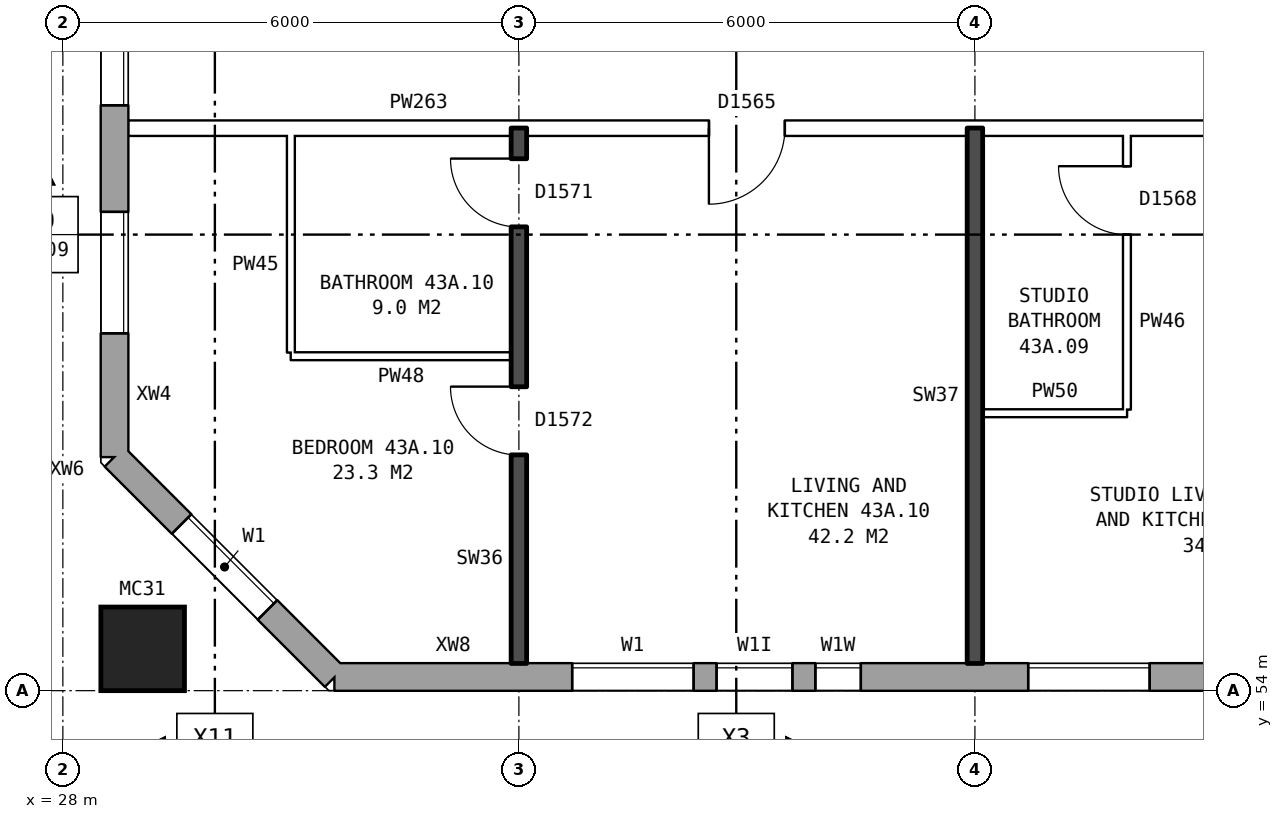
"""IFC4 building model, lengths in metres.
Left out: names, types, materials, properties, quantities, classifications, styles, units other than length and angle.
Written with IfcOpenShell. Run it as: python <this file> out.ifc"""

import sys

from ifc_helpers import new_model, si_unit, direction, frame, frame_2d, origin, origin_2d, place, context, subcontext, project, spatial, rectangle, hollow_rectangle, extrude, element, fill, save


model = new_model("IFC4")
c1 = context("Model", 3, precision=1e-05, world=origin(), true_north=direction((0.0, 1.0)))
c2 = subcontext(c1, "Body", "Model", "MODEL_VIEW")
j1 = project(units=[si_unit("LENGTHUNIT", "METRE"), si_unit("PLANEANGLEUNIT", "RADIAN")], contexts=[c1])
p1 = place(None, origin())
s1 = spatial("IfcSite", under=j1, at=p1, CompositionType="ELEMENT")
p2 = place(p1, origin())
s2 = spatial("IfcBuilding", under=s1, at=p2, CompositionType="ELEMENT")
p3 = place(p2, frame((0.0, 0.0, 154.7)))
s3 = spatial("IfcBuildingStorey", under=s2, at=p3, CompositionType="ELEMENT", Elevation=154.7)
p4 = place(p3, frame((29.05, 54.55, 0.0), z_axis=(0.0, 0.0, 1.0), x_axis=(1.0, 0.0, 0.0)))
e1 = element("IfcColumn", 1, at=p4, inside=s3, PredefinedType="COLUMN", context=c2, shape_type="SweptSolid", body=[
    extrude(hollow_rectangle(XDim=1.1, YDim=1.1, WallThickness=0.06, at=origin_2d()), origin(), (0.0, 0.0, 1.0), 3.1),
])
p5 = place(p3, frame((28.68, 57.075, 0.0), z_axis=(0.0, 0.0, 1.0), x_axis=(0.707106781187, -0.707106781187, 0.0)))
e2 = element("IfcWall", 2, at=p5, inside=s3, PredefinedType="STANDARD", context=c2, shape_type="SweptSolid", body=[
    extrude(rectangle(XDim=4.094, YDim=0.36, at=frame_2d((2.047, 0.0))), origin(), (0.0, 0.0, 1.0), 2.85),
])
p6 = place(p5, frame((1.247, 0.0, 0.8)))
e3 = element("IfcOpeningElement", 3, at=p6, cuts=e2, PredefinedType="OPENING", context=c2, shape_type="SweptSolid", body=[
    extrude(rectangle(XDim=1.6, YDim=1.8, at=frame_2d((0.8, 0.9))), frame((0.0, 0.19, 0.0), z_axis=(0.0, -1.0, 0.0), x_axis=(1.0, 0.0, 0.0)), (0.0, 0.0, 1.0), 0.38),
])
p7 = place(p3, frame((31.575, 54.18, 0.0), z_axis=(0.0, 0.0, 1.0), x_axis=(1.0, 0.0, 0.0)))
e4 = element("IfcWall", 4, at=p7, inside=s3, PredefinedType="STANDARD", context=c2, shape_type="SweptSolid", body=[
    extrude(rectangle(XDim=41.351, YDim=0.36, at=frame_2d((20.675, 0.0))), origin(), (0.0, 0.0, 1.0), 2.85),
])
p8 = place(p7, frame((3.125, 0.0, 0.8)))
e5 = element("IfcOpeningElement", 5, at=p8, cuts=e4, PredefinedType="OPENING", context=c2, shape_type="SweptSolid", body=[
    extrude(rectangle(XDim=1.6, YDim=1.8, at=frame_2d((0.8, 0.9))), frame((0.0, 0.19, 0.0), z_axis=(0.0, -1.0, 0.0), x_axis=(1.0, 0.0, 0.0)), (0.0, 0.0, 1.0), 0.38),
])
p9 = place(p7, frame((5.025, 0.0, 1.0)))
e6 = element("IfcOpeningElement", 6, at=p9, cuts=e4, PredefinedType="OPENING", context=c2, shape_type="SweptSolid", body=[
    extrude(rectangle(XDim=1.0, YDim=1.5, at=frame_2d((0.5, 0.75))), frame((0.0, 0.19, 0.0), z_axis=(0.0, -1.0, 0.0), x_axis=(1.0, 0.0, 0.0)), (0.0, 0.0, 1.0), 0.38),
])
p10 = place(p7, frame((9.125, 0.0, 0.8)))
e7 = element("IfcOpeningElement", 7, at=p10, cuts=e4, PredefinedType="OPENING", context=c2, shape_type="SweptSolid", body=[
    extrude(rectangle(XDim=1.6, YDim=1.8, at=frame_2d((0.8, 0.9))), frame((0.0, 0.19, 0.0), z_axis=(0.0, -1.0, 0.0), x_axis=(1.0, 0.0, 0.0)), (0.0, 0.0, 1.0), 0.38),
])
p11 = place(p7, frame((12.125, 0.0, 0.8)))
e8 = element("IfcOpeningElement", 8, at=p11, cuts=e4, PredefinedType="OPENING", context=c2, shape_type="SweptSolid", body=[
    extrude(rectangle(XDim=1.6, YDim=1.8, at=frame_2d((0.8, 0.9))), frame((0.0, 0.19, 0.0), z_axis=(0.0, -1.0, 0.0), x_axis=(1.0, 0.0, 0.0)), (0.0, 0.0, 1.0), 0.38),
])
p12 = place(p7, frame((15.125, 0.0, 0.8)))
e9 = element("IfcOpeningElement", 9, at=p12, cuts=e4, PredefinedType="OPENING", context=c2, shape_type="SweptSolid", body=[
    extrude(rectangle(XDim=1.6, YDim=1.8, at=frame_2d((0.8, 0.9))), frame((0.0, 0.19, 0.0), z_axis=(0.0, -1.0, 0.0), x_axis=(1.0, 0.0, 0.0)), (0.0, 0.0, 1.0), 0.38),
])
p13 = place(p7, frame((18.125, 0.0, 0.8)))
e10 = element("IfcOpeningElement", 10, at=p13, cuts=e4, PredefinedType="OPENING", context=c2, shape_type="SweptSolid", body=[
    extrude(rectangle(XDim=1.6, YDim=1.8, at=frame_2d((0.8, 0.9))), frame((0.0, 0.19, 0.0), z_axis=(0.0, -1.0, 0.0), x_axis=(1.0, 0.0, 0.0)), (0.0, 0.0, 1.0), 0.38),
])
p14 = place(p7, frame((21.125, 0.0, 0.8)))
e11 = element("IfcOpeningElement", 11, at=p14, cuts=e4, PredefinedType="OPENING", context=c2, shape_type="SweptSolid", body=[
    extrude(rectangle(XDim=1.6, YDim=1.8, at=frame_2d((0.8, 0.9))), frame((0.0, 0.19, 0.0), z_axis=(0.0, -1.0, 0.0), x_axis=(1.0, 0.0, 0.0)), (0.0, 0.0, 1.0), 0.38),
])
p15 = place(p7, frame((24.125, 0.0, 0.8)))
e12 = element("IfcOpeningElement", 12, at=p15, cuts=e4, PredefinedType="OPENING", context=c2, shape_type="SweptSolid", body=[
    extrude(rectangle(XDim=1.6, YDim=1.8, at=frame_2d((0.8, 0.9))), frame((0.0, 0.19, 0.0), z_axis=(0.0, -1.0, 0.0), x_axis=(1.0, 0.0, 0.0)), (0.0, 0.0, 1.0), 0.38),
])
p16 = place(p7, frame((27.125, 0.0, 0.8)))
e13 = element("IfcOpeningElement", 13, at=p16, cuts=e4, PredefinedType="OPENING", context=c2, shape_type="SweptSolid", body=[
    extrude(rectangle(XDim=1.6, YDim=1.8, at=frame_2d((0.8, 0.9))), frame((0.0, 0.19, 0.0), z_axis=(0.0, -1.0, 0.0), x_axis=(1.0, 0.0, 0.0)), (0.0, 0.0, 1.0), 0.38),
])
p17 = place(p7, frame((30.125, 0.0, 0.8)))
e14 = element("IfcOpeningElement", 14, at=p17, cuts=e4, PredefinedType="OPENING", context=c2, shape_type="SweptSolid", body=[
    extrude(rectangle(XDim=1.6, YDim=1.8, at=frame_2d((0.8, 0.9))), frame((0.0, 0.19, 0.0), z_axis=(0.0, -1.0, 0.0), x_axis=(1.0, 0.0, 0.0)), (0.0, 0.0, 1.0), 0.38),
])
p18 = place(p7, frame((34.425, 0.0, 1.7)))
e15 = element("IfcOpeningElement", 15, at=p18, cuts=e4, PredefinedType="OPENING", context=c2, shape_type="SweptSolid", body=[
    extrude(rectangle(XDim=1.4, YDim=0.9, at=frame_2d((0.7, 0.45))), frame((0.0, 0.19, 0.0), z_axis=(0.0, -1.0, 0.0), x_axis=(1.0, 0.0, 0.0)), (0.0, 0.0, 1.0), 0.38),
])
p19 = place(p7, frame((36.125, 0.0, 0.8)))
e16 = element("IfcOpeningElement", 16, at=p19, cuts=e4, PredefinedType="OPENING", context=c2, shape_type="SweptSolid", body=[
    extrude(rectangle(XDim=1.6, YDim=1.8, at=frame_2d((0.8, 0.9))), frame((0.0, 0.19, 0.0), z_axis=(0.0, -1.0, 0.0), x_axis=(1.0, 0.0, 0.0)), (0.0, 0.0, 1.0), 0.38),
])
p20 = place(p7, frame((39.125, 0.0, 0.8)))
e17 = element("IfcOpeningElement", 17, at=p20, cuts=e4, PredefinedType="OPENING", context=c2, shape_type="SweptSolid", body=[
    extrude(rectangle(XDim=1.6, YDim=1.8, at=frame_2d((0.8, 0.9))), frame((0.0, 0.19, 0.0), z_axis=(0.0, -1.0, 0.0), x_axis=(1.0, 0.0, 0.0)), (0.0, 0.0, 1.0), 0.38),
])
p21 = place(p7, frame((6.325, 0.0, 1.7)))
e18 = element("IfcOpeningElement", 18, at=p21, cuts=e4, PredefinedType="OPENING", context=c2, shape_type="SweptSolid", body=[
    extrude(rectangle(XDim=0.6, YDim=0.9, at=frame_2d((0.3, 0.45))), frame((0.0, 0.19, 0.0), z_axis=(0.0, -1.0, 0.0), x_axis=(1.0, 0.0, 0.0)), (0.0, 0.0, 1.0), 0.38),
])
p22 = place(p3, frame((28.68, 82.925, 0.0), z_axis=(0.0, 0.0, 1.0), x_axis=(0.0, -1.0, 0.0)))
e19 = element("IfcWall", 19, at=p22, inside=s3, PredefinedType="STANDARD", context=c2, shape_type="SweptSolid", body=[
    extrude(rectangle(XDim=25.851, YDim=0.36, at=frame_2d((12.925, 0.0))), origin(), (0.0, 0.0, 1.0), 2.85),
])
p23 = place(p22, frame((1.625, 0.0, 0.8)))
e20 = element("IfcOpeningElement", 20, at=p23, cuts=e19, PredefinedType="OPENING", context=c2, shape_type="SweptSolid", body=[
    extrude(rectangle(XDim=1.6, YDim=1.8, at=frame_2d((0.8, 0.9))), frame((0.0, 0.19, 0.0), z_axis=(0.0, -1.0, 0.0), x_axis=(1.0, 0.0, 0.0)), (0.0, 0.0, 1.0), 0.38),
])
p24 = place(p22, frame((4.625, 0.0, 0.8)))
e21 = element("IfcOpeningElement", 21, at=p24, cuts=e19, PredefinedType="OPENING", context=c2, shape_type="SweptSolid", body=[
    extrude(rectangle(XDim=1.6, YDim=1.8, at=frame_2d((0.8, 0.9))), frame((0.0, 0.19, 0.0), z_axis=(0.0, -1.0, 0.0), x_axis=(1.0, 0.0, 0.0)), (0.0, 0.0, 1.0), 0.38),
])
p25 = place(p22, frame((7.625, 0.0, 0.8)))
e22 = element("IfcOpeningElement", 22, at=p25, cuts=e19, PredefinedType="OPENING", context=c2, shape_type="SweptSolid", body=[
    extrude(rectangle(XDim=1.6, YDim=1.8, at=frame_2d((0.8, 0.9))), frame((0.0, 0.19, 0.0), z_axis=(0.0, -1.0, 0.0), x_axis=(1.0, 0.0, 0.0)), (0.0, 0.0, 1.0), 0.38),
])
p26 = place(p22, frame((6.525, 0.0, 0.8)))
e23 = element("IfcOpeningElement", 23, at=p26, cuts=e19, PredefinedType="OPENING", context=c2, shape_type="SweptSolid", body=[
    extrude(rectangle(XDim=0.8, YDim=1.8, at=frame_2d((0.4, 0.9))), frame((0.0, 0.19, 0.0), z_axis=(0.0, -1.0, 0.0), x_axis=(1.0, 0.0, 0.0)), (0.0, 0.0, 1.0), 0.38),
])
p27 = place(p22, frame((9.525, 0.0, 1.7)))
e24 = element("IfcOpeningElement", 24, at=p27, cuts=e19, PredefinedType="OPENING", context=c2, shape_type="SweptSolid", body=[
    extrude(rectangle(XDim=0.8, YDim=0.9, at=frame_2d((0.4, 0.45))), frame((0.0, 0.19, 0.0), z_axis=(0.0, -1.0, 0.0), x_axis=(1.0, 0.0, 0.0)), (0.0, 0.0, 1.0), 0.38),
])
p28 = place(p22, frame((16.625, 0.0, 0.8)))
e25 = element("IfcOpeningElement", 25, at=p28, cuts=e19, PredefinedType="OPENING", context=c2, shape_type="SweptSolid", body=[
    extrude(rectangle(XDim=1.6, YDim=1.8, at=frame_2d((0.8, 0.9))), frame((0.0, 0.19, 0.0), z_axis=(0.0, -1.0, 0.0), x_axis=(1.0, 0.0, 0.0)), (0.0, 0.0, 1.0), 0.38),
])
p29 = place(p22, frame((19.625, 0.0, 0.8)))
e26 = element("IfcOpeningElement", 26, at=p29, cuts=e19, PredefinedType="OPENING", context=c2, shape_type="SweptSolid", body=[
    extrude(rectangle(XDim=1.6, YDim=1.8, at=frame_2d((0.8, 0.9))), frame((0.0, 0.19, 0.0), z_axis=(0.0, -1.0, 0.0), x_axis=(1.0, 0.0, 0.0)), (0.0, 0.0, 1.0), 0.38),
])
p30 = place(p22, frame((22.625, 0.0, 0.8)))
e27 = element("IfcOpeningElement", 27, at=p30, cuts=e19, PredefinedType="OPENING", context=c2, shape_type="SweptSolid", body=[
    extrude(rectangle(XDim=1.6, YDim=1.8, at=frame_2d((0.8, 0.9))), frame((0.0, 0.19, 0.0), z_axis=(0.0, -1.0, 0.0), x_axis=(1.0, 0.0, 0.0)), (0.0, 0.0, 1.0), 0.38),
])
p31 = place(p22, frame((11.425, 0.0, 0.8)))
e28 = element("IfcOpeningElement", 28, at=p31, cuts=e19, PredefinedType="OPENING", context=c2, shape_type="SweptSolid", body=[
    extrude(rectangle(XDim=0.6, YDim=0.9, at=frame_2d((0.3, 0.45))), frame((0.0, 0.19, 0.0), z_axis=(0.0, -1.0, 0.0), x_axis=(1.0, 0.0, 0.0)), (0.0, 0.0, 1.0), 0.38),
])
p32 = place(p22, frame((12.325, 0.0, 0.8)))
e29 = element("IfcOpeningElement", 29, at=p32, cuts=e19, PredefinedType="OPENING", context=c2, shape_type="SweptSolid", body=[
    extrude(rectangle(XDim=1.2, YDim=1.8, at=frame_2d((0.6, 0.9))), frame((0.0, 0.19, 0.0), z_axis=(0.0, -1.0, 0.0), x_axis=(1.0, 0.0, 0.0)), (0.0, 0.0, 1.0), 0.38),
])
p33 = place(p22, frame((13.825, 0.0, 0.8)))
e30 = element("IfcOpeningElement", 30, at=p33, cuts=e19, PredefinedType="OPENING", context=c2, shape_type="SweptSolid", body=[
    extrude(rectangle(XDim=0.6, YDim=0.9, at=frame_2d((0.3, 0.45))), frame((0.0, 0.19, 0.0), z_axis=(0.0, -1.0, 0.0), x_axis=(1.0, 0.0, 0.0)), (0.0, 0.0, 1.0), 0.38),
])
p34 = place(p22, frame((15.475, 0.0, 1.7)))
e31 = element("IfcOpeningElement", 31, at=p34, cuts=e19, PredefinedType="OPENING", context=c2, shape_type="SweptSolid", body=[
    extrude(rectangle(XDim=0.6, YDim=0.9, at=frame_2d((0.3, 0.45))), frame((0.0, 0.19, 0.0), z_axis=(0.0, -1.0, 0.0), x_axis=(1.0, 0.0, 0.0)), (0.0, 0.0, 1.0), 0.38),
])
p35 = place(p22, frame((18.525, 0.0, 0.8)))
e32 = element("IfcOpeningElement", 32, at=p35, cuts=e19, PredefinedType="OPENING", context=c2, shape_type="SweptSolid", body=[
    extrude(rectangle(XDim=0.8, YDim=1.8, at=frame_2d((0.4, 0.9))), frame((0.0, 0.19, 0.0), z_axis=(0.0, -1.0, 0.0), x_axis=(1.0, 0.0, 0.0)), (0.0, 0.0, 1.0), 0.38),
])
p36 = place(p3, frame((40.1, 57.65, 0.0), z_axis=(0.0, 0.0, 1.0), x_axis=(1.0, 0.0, 0.0)))
e33 = element("IfcWall", 33, at=p36, inside=s3, PredefinedType="PARTITIONING", context=c2, shape_type="SweptSolid", body=[
    extrude(rectangle(XDim=1.9, YDim=0.1, at=frame_2d((0.95, 0.0))), origin(), (0.0, 0.0, 1.0), 2.85),
])
p37 = place(p3, frame((31.0, 58.4, 0.0), z_axis=(0.0, 0.0, 1.0), x_axis=(1.0, 0.0, 0.0)))
e34 = element("IfcWall", 34, at=p37, inside=s3, PredefinedType="PARTITIONING", context=c2, shape_type="SweptSolid", body=[
    extrude(rectangle(XDim=2.9, YDim=0.1, at=frame_2d((1.45, 0.0))), origin(), (0.0, 0.0, 1.0), 2.85),
])
p38 = place(p3, frame((28.86, 61.4, 0.0), z_axis=(0.0, 0.0, 1.0), x_axis=(1.0, 0.0, 0.0)))
e35 = element("IfcWall", 35, at=p38, inside=s3, PredefinedType="PARTITIONING", context=c2, shape_type="SweptSolid", body=[
    extrude(rectangle(XDim=17.04, YDim=0.2, at=frame_2d((8.52, 0.0))), origin(), (0.0, 0.0, 1.0), 2.85),
])
p39 = place(p38, frame((14.59, 0.0, 0.0)))
e36 = element("IfcOpeningElement", 36, at=p39, cuts=e35, PredefinedType="OPENING", context=c2, shape_type="SweptSolid", body=[
    extrude(rectangle(XDim=1.0, YDim=2.1, at=frame_2d((0.5, 1.05))), frame((0.0, 0.11, 0.0), z_axis=(0.0, -1.0, 0.0), x_axis=(1.0, 0.0, 0.0)), (0.0, 0.0, 1.0), 0.22),
])
p40 = place(p38, frame((7.64, 0.0, 0.0)))
e37 = element("IfcOpeningElement", 37, at=p40, cuts=e35, PredefinedType="OPENING", context=c2, shape_type="SweptSolid", body=[
    extrude(rectangle(XDim=1.0, YDim=2.1, at=frame_2d((0.5, 1.05))), frame((0.0, 0.11, 0.0), z_axis=(0.0, -1.0, 0.0), x_axis=(1.0, 0.0, 0.0)), (0.0, 0.0, 1.0), 0.22),
])
p41 = place(p3, frame((31.0, 58.45, 0.0), z_axis=(0.0, 0.0, 1.0), x_axis=(0.0, 1.0, 0.0)))
e38 = element("IfcWall", 38, at=p41, inside=s3, PredefinedType="PARTITIONING", context=c2, shape_type="SweptSolid", body=[
    extrude(rectangle(XDim=2.85, YDim=0.1, at=frame_2d((1.425, 0.0))), origin(), (0.0, 0.0, 1.0), 2.85),
])
p42 = place(p3, frame((34.0, 54.36, 0.0), z_axis=(0.0, 0.0, 1.0), x_axis=(0.0, 1.0, 0.0)))
e39 = element("IfcWall", 39, at=p42, inside=s3, PredefinedType="SOLIDWALL", context=c2, shape_type="SweptSolid", body=[
    extrude(rectangle(XDim=7.04, YDim=0.2, at=frame_2d((3.52, 0.0))), origin(), (0.0, 0.0, 1.0), 2.85),
])
p43 = place(p42, frame((2.74, 0.0, 0.0)))
e40 = element("IfcOpeningElement", 40, at=p43, cuts=e39, PredefinedType="OPENING", context=c2, shape_type="SweptSolid", body=[
    extrude(rectangle(XDim=0.9, YDim=2.1, at=frame_2d((0.45, 1.05))), frame((0.0, 0.11, 0.0), z_axis=(0.0, -1.0, 0.0), x_axis=(1.0, 0.0, 0.0)), (0.0, 0.0, 1.0), 0.22),
])
p44 = place(p42, frame((5.74, 0.0, 0.0)))
e41 = element("IfcOpeningElement", 41, at=p44, cuts=e39, PredefinedType="OPENING", context=c2, shape_type="SweptSolid", body=[
    extrude(rectangle(XDim=0.9, YDim=2.1, at=frame_2d((0.45, 1.05))), frame((0.0, 0.11, 0.0), z_axis=(0.0, -1.0, 0.0), x_axis=(1.0, 0.0, 0.0)), (0.0, 0.0, 1.0), 0.22),
])
p45 = place(p3, frame((40.0, 54.36, 0.0), z_axis=(0.0, 0.0, 1.0), x_axis=(0.0, 1.0, 0.0)))
e42 = element("IfcWall", 42, at=p45, inside=s3, PredefinedType="SOLIDWALL", context=c2, shape_type="SweptSolid", body=[
    extrude(rectangle(XDim=7.04, YDim=0.2, at=frame_2d((3.52, 0.0))), origin(), (0.0, 0.0, 1.0), 2.85),
])
p46 = place(p3, frame((42.0, 57.7, 0.0), z_axis=(0.0, 0.0, 1.0), x_axis=(0.0, 1.0, 0.0)))
e43 = element("IfcWall", 43, at=p46, inside=s3, PredefinedType="PARTITIONING", context=c2, shape_type="SweptSolid", body=[
    extrude(rectangle(XDim=3.6, YDim=0.1, at=frame_2d((1.8, 0.0))), origin(), (0.0, 0.0, 1.0), 2.85),
])
p47 = place(p46, frame((2.3, 0.0, 0.0)))
e44 = element("IfcOpeningElement", 44, at=p47, cuts=e43, PredefinedType="OPENING", context=c2, shape_type="SweptSolid", body=[
    extrude(rectangle(XDim=0.9, YDim=2.1, at=frame_2d((0.45, 1.05))), frame((0.0, 0.06, 0.0), z_axis=(0.0, -1.0, 0.0), x_axis=(1.0, 0.0, 0.0)), (0.0, 0.0, 1.0), 0.12),
])
p48 = place(p6, origin())
e45 = element("IfcWindow", 45, at=p48, inside=s3, PartitioningType="SINGLE_PANEL", PredefinedType="WINDOW", context=c2, shape_type="SweptSolid", body=[
    extrude(rectangle(XDim=1.6, YDim=1.8, at=frame_2d((0.8, 0.9))), frame((0.0, 0.15, 0.0), z_axis=(0.0, -1.0, 0.0), x_axis=(1.0, 0.0, 0.0)), (0.0, 0.0, 1.0), 0.06),
])
fill(e3, e45)
p49 = place(p8, origin())
e46 = element("IfcWindow", 46, at=p49, inside=s3, PartitioningType="SINGLE_PANEL", PredefinedType="WINDOW", context=c2, shape_type="SweptSolid", body=[
    extrude(rectangle(XDim=1.6, YDim=1.8, at=frame_2d((0.8, 0.9))), frame((0.0, 0.15, 0.0), z_axis=(0.0, -1.0, 0.0), x_axis=(1.0, 0.0, 0.0)), (0.0, 0.0, 1.0), 0.06),
])
fill(e5, e46)
p50 = place(p9, origin())
e47 = element("IfcWindow", 47, at=p50, inside=s3, PartitioningType="SINGLE_PANEL", PredefinedType="WINDOW", context=c2, shape_type="SweptSolid", body=[
    extrude(rectangle(XDim=1.0, YDim=1.5, at=frame_2d((0.5, 0.75))), frame((0.0, 0.15, 0.0), z_axis=(0.0, -1.0, 0.0), x_axis=(1.0, 0.0, 0.0)), (0.0, 0.0, 1.0), 0.06),
])
fill(e6, e47)
p51 = place(p10, origin())
e48 = element("IfcWindow", 48, at=p51, inside=s3, PartitioningType="SINGLE_PANEL", PredefinedType="WINDOW", context=c2, shape_type="SweptSolid", body=[
    extrude(rectangle(XDim=1.6, YDim=1.8, at=frame_2d((0.8, 0.9))), frame((0.0, 0.15, 0.0), z_axis=(0.0, -1.0, 0.0), x_axis=(1.0, 0.0, 0.0)), (0.0, 0.0, 1.0), 0.06),
])
fill(e7, e48)
p52 = place(p29, origin())
e49 = element("IfcWindow", 49, at=p52, inside=s3, PartitioningType="SINGLE_PANEL", PredefinedType="WINDOW", context=c2, shape_type="SweptSolid", body=[
    extrude(rectangle(XDim=1.6, YDim=1.8, at=frame_2d((0.8, 0.9))), frame((0.0, 0.15, 0.0), z_axis=(0.0, -1.0, 0.0), x_axis=(1.0, 0.0, 0.0)), (0.0, 0.0, 1.0), 0.06),
])
fill(e26, e49)
p53 = place(p30, origin())
e50 = element("IfcWindow", 50, at=p53, inside=s3, PartitioningType="SINGLE_PANEL", PredefinedType="WINDOW", context=c2, shape_type="SweptSolid", body=[
    extrude(rectangle(XDim=1.6, YDim=1.8, at=frame_2d((0.8, 0.9))), frame((0.0, 0.15, 0.0), z_axis=(0.0, -1.0, 0.0), x_axis=(1.0, 0.0, 0.0)), (0.0, 0.0, 1.0), 0.06),
])
fill(e27, e50)
p54 = place(p47, origin())
e51 = element("IfcDoor", 51, at=p54, inside=s3, OperationType="SINGLE_SWING_RIGHT", PredefinedType="DOOR", context=c2, shape_type="SweptSolid", body=[
    extrude(rectangle(XDim=0.9, YDim=2.1, at=frame_2d((0.45, 1.05))), frame((0.0, 0.025, 0.0), z_axis=(0.0, -1.0, 0.0), x_axis=(1.0, 0.0, 0.0)), (0.0, 0.0, 1.0), 0.05),
])
fill(e44, e51)
p55 = place(p43, origin())
e52 = element("IfcDoor", 52, at=p55, inside=s3, OperationType="SINGLE_SWING_RIGHT", PredefinedType="DOOR", context=c2, shape_type="SweptSolid", body=[
    extrude(rectangle(XDim=0.9, YDim=2.1, at=frame_2d((0.45, 1.05))), frame((0.0, 0.025, 0.0), z_axis=(0.0, -1.0, 0.0), x_axis=(1.0, 0.0, 0.0)), (0.0, 0.0, 1.0), 0.05),
])
fill(e40, e52)
p56 = place(p40, frame((1.0, 0.0, 0.0), z_axis=(0.0, 0.0, 1.0), x_axis=(-1.0, 0.0, 0.0)))
e53 = element("IfcDoor", 53, at=p56, inside=s3, OperationType="SINGLE_SWING_RIGHT", PredefinedType="DOOR", context=c2, shape_type="SweptSolid", body=[
    extrude(rectangle(XDim=1.0, YDim=2.1, at=frame_2d((0.5, 1.05))), frame((0.0, 0.025, 0.0), z_axis=(0.0, -1.0, 0.0), x_axis=(1.0, 0.0, 0.0)), (0.0, 0.0, 1.0), 0.05),
])
fill(e37, e53)
p57 = place(p44, origin())
e54 = element("IfcDoor", 54, at=p57, inside=s3, OperationType="SINGLE_SWING_RIGHT", PredefinedType="DOOR", context=c2, shape_type="SweptSolid", body=[
    extrude(rectangle(XDim=0.9, YDim=2.1, at=frame_2d((0.45, 1.05))), frame((0.0, 0.025, 0.0), z_axis=(0.0, -1.0, 0.0), x_axis=(1.0, 0.0, 0.0)), (0.0, 0.0, 1.0), 0.05),
])
fill(e41, e54)
p58 = place(p21, origin())
e55 = element("IfcWindow", 55, at=p58, inside=s3, PartitioningType="SINGLE_PANEL", PredefinedType="WINDOW", context=c2, shape_type="SweptSolid", body=[
    extrude(rectangle(XDim=0.6, YDim=0.9, at=frame_2d((0.3, 0.45))), frame((0.0, 0.15, 0.0), z_axis=(0.0, -1.0, 0.0), x_axis=(1.0, 0.0, 0.0)), (0.0, 0.0, 1.0), 0.06),
])
fill(e18, e55)
save(model, sys.argv[1])
